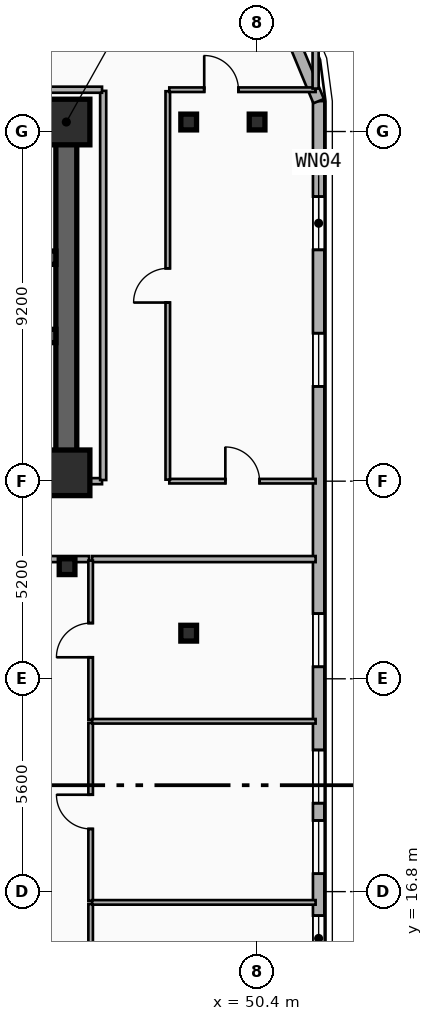
"""IFC4 building model, lengths in metres.
Left out: names, types, materials, properties, quantities, classifications, styles, units other than length and angle.
Written with IfcOpenShell. Run it as: python <this file> out.ifc"""

import sys

from ifc_helpers import new_model, si_unit, direction, frame, frame_2d, origin, origin_2d, place, context, subcontext, project, spatial, rectangle, i_section, extrude, element, fill, save


model = new_model("IFC4")
c1 = context("Model", 3, precision=1e-05, world=origin(), true_north=direction((0.0, 1.0)))
c2 = subcontext(c1, "Body", "Model", "MODEL_VIEW")
j1 = project(units=[si_unit("LENGTHUNIT", "METRE"), si_unit("PLANEANGLEUNIT", "RADIAN")], contexts=[c1])
p1 = place(None, origin())
s1 = spatial("IfcSite", under=j1, at=p1, CompositionType="ELEMENT")
p2 = place(p1, origin())
s2 = spatial("IfcBuilding", under=s1, at=p2, CompositionType="ELEMENT")
p3 = place(p2, frame((0.0, 0.0, 159.0)))
s3 = spatial("IfcBuildingStorey", under=s2, at=p3, CompositionType="ELEMENT", Elevation=159.0)
p4 = place(p3, frame((12.15, 37.05, 0.0), z_axis=(0.0, 0.0, 1.0), x_axis=(1.0, 0.0, 0.0)))
e1 = element("IfcWall", 1, at=p4, inside=s3, PredefinedType="SHEAR", context=c2, shape_type="SweptSolid", body=[
    extrude(rectangle(XDim=33.23, YDim=0.55, at=frame_2d((16.615, 0.0))), origin(), (0.0, 0.0, 1.0), 3.55),
])
p5 = place(p3, frame((45.38, 27.82, 0.0), z_axis=(0.0, 0.0, 1.0), x_axis=(-1.0, 0.0, 0.0)))
e2 = element("IfcWall", 2, at=p5, inside=s3, PredefinedType="SHEAR", context=c2, shape_type="SweptSolid", body=[
    extrude(rectangle(XDim=12.23, YDim=0.55, at=frame_2d((6.115, 0.0))), origin(), (0.0, 0.0, 1.0), 3.55),
])
p6 = place(p5, frame((9.93, 0.0, 0.0)))
e3 = element("IfcOpeningElement", 3, at=p6, cuts=e2, PredefinedType="OPENING", context=c2, shape_type="SweptSolid", body=[
    extrude(rectangle(XDim=1.1, YDim=2.15, at=frame_2d((0.55, 1.075))), frame((0.0, 0.285, 0.0), z_axis=(0.0, -1.0, 0.0), x_axis=(1.0, 0.0, 0.0)), (0.0, 0.0, 1.0), 0.57),
])
p7 = place(p5, frame((6.23, 0.0, 0.0)))
e4 = element("IfcOpeningElement", 4, at=p7, cuts=e2, PredefinedType="OPENING", context=c2, shape_type="SweptSolid", body=[
    extrude(rectangle(XDim=1.1, YDim=2.15, at=frame_2d((0.55, 1.075))), frame((0.0, 0.285, 0.0), z_axis=(0.0, -1.0, 0.0), x_axis=(1.0, 0.0, 0.0)), (0.0, 0.0, 1.0), 0.57),
])
p8 = place(p3, frame((45.38, 28.095, 0.0), z_axis=(0.0, 0.0, 1.0), x_axis=(0.0, 1.0, 0.0)))
e5 = element("IfcWall", 5, at=p8, inside=s3, PredefinedType="SHEAR", context=c2, shape_type="SweptSolid", body=[
    extrude(rectangle(XDim=8.68, YDim=0.55, at=frame_2d((4.34, 0.0))), origin(), (0.0, 0.0, 1.0), 3.55),
])
p9 = place(p3, frame((45.105, 33.48, 0.0), z_axis=(0.0, 0.0, 1.0), x_axis=(-1.0, 0.0, 0.0)))
e6 = element("IfcWall", 6, at=p9, inside=s3, PredefinedType="SHEAR", context=c2, shape_type="SweptSolid", body=[
    extrude(rectangle(XDim=8.55, YDim=0.35, at=frame_2d((4.275, 0.0))), origin(), (0.0, 0.0, 1.0), 3.55),
])
p10 = place(p9, frame((7.205, 0.0, 0.0)))
e7 = element("IfcOpeningElement", 7, at=p10, cuts=e6, PredefinedType="OPENING", context=c2, shape_type="SweptSolid", body=[
    extrude(rectangle(XDim=1.1, YDim=2.15, at=frame_2d((0.55, 1.075))), frame((0.0, 0.185, 0.0), z_axis=(0.0, -1.0, 0.0), x_axis=(1.0, 0.0, 0.0)), (0.0, 0.0, 1.0), 0.37),
])
p11 = place(p3, frame((36.555, 31.42, 0.0), z_axis=(0.0, 0.0, 1.0), x_axis=(1.0, 0.0, 0.0)))
e8 = element("IfcWall", 8, at=p11, inside=s3, PredefinedType="SHEAR", context=c2, shape_type="SweptSolid", body=[
    extrude(rectangle(XDim=8.55, YDim=0.35, at=frame_2d((4.275, 0.0))), origin(), (0.0, 0.0, 1.0), 3.55),
])
for number, where, z_axis, x_axis in (
    (9, (45.4, 27.82, 0.0), (0.0, 0.0, 1.0), (1.0, 0.0, 0.0)),
    (10, (45.4, 37.05, 0.0), (0.0, 0.0, 1.0), (1.0, 0.0, 0.0)),
):
    element("IfcColumn", number, at=place(p3, frame(where, z_axis=z_axis, x_axis=x_axis)), inside=s3, PredefinedType="COLUMN", context=c2, shape_type="SweptSolid", body=[
        extrude(rectangle(XDim=1.2, YDim=1.2, at=origin_2d()), origin(), (0.0, 0.0, 1.0), 3.55),
    ])
for number, where, z_axis, x_axis in (
    (11, (45.4, 25.35, 0.0), (0.0, 0.0, 1.0), (1.0, 0.0, 0.0)),
    (12, (48.6, 23.6, 0.0), (0.0, 0.0, 1.0), (1.0, 0.0, 0.0)),
    (13, (48.6, 37.05, 0.0), (0.0, 0.0, 1.0), (1.0, 0.0, 0.0)),
    (14, (50.4, 37.05, 0.0), (0.0, 0.0, 1.0), (1.0, 0.0, 0.0)),
):
    element("IfcColumn", number, at=place(p3, frame(where, z_axis=z_axis, x_axis=x_axis)), inside=s3, PredefinedType="COLUMN", context=c2, shape_type="SweptSolid", body=[
        extrude(i_section(OverallWidth=0.413, OverallDepth=0.415, WebThickness=0.03, FlangeThickness=0.047, FilletRadius=0.015, at=origin_2d()), origin(), (0.0, 0.0, 1.0), 3.55),
    ])
p12 = place(p3, frame((52.02, 37.6, 0.0), z_axis=(0.0, 0.0, 1.0), x_axis=(0.0, -1.0, 0.0)))
e15 = element("IfcWall", 15, at=p12, inside=s3, PredefinedType="SOLIDWALL", context=c2, shape_type="SweptSolid", body=[
    extrude(rectangle(XDim=23.0, YDim=0.3, at=frame_2d((11.5, 0.0))), origin(), (0.0, 0.0, 1.0), 3.29),
])
p13 = place(p12, frame((2.513, 0.0, 0.34)))
e16 = element("IfcOpeningElement", 16, at=p13, cuts=e15, PredefinedType="OPENING", context=c2, shape_type="SweptSolid", body=[
    extrude(rectangle(XDim=1.4, YDim=2.1, at=frame_2d((0.7, 1.05))), frame((0.0, 0.16, 0.0), z_axis=(0.0, -1.0, 0.0), x_axis=(1.0, 0.0, 0.0)), (0.0, 0.0, 1.0), 0.32),
])
p14 = place(p12, frame((6.107, 0.0, 0.34)))
e17 = element("IfcOpeningElement", 17, at=p14, cuts=e15, PredefinedType="OPENING", context=c2, shape_type="SweptSolid", body=[
    extrude(rectangle(XDim=1.4, YDim=2.1, at=frame_2d((0.7, 1.05))), frame((0.0, 0.16, 0.0), z_axis=(0.0, -1.0, 0.0), x_axis=(1.0, 0.0, 0.0)), (0.0, 0.0, 1.0), 0.32),
])
p15 = place(p12, frame((21.431, 0.0, 0.68)))
e18 = element("IfcOpeningElement", 18, at=p15, cuts=e15, PredefinedType="OPENING", context=c2, shape_type="SweptSolid", body=[
    extrude(rectangle(XDim=1.2, YDim=1.5, at=frame_2d((0.6, 0.75))), frame((0.0, 0.16, 0.0), z_axis=(0.0, -1.0, 0.0), x_axis=(1.0, 0.0, 0.0)), (0.0, 0.0, 1.0), 0.32),
])
p16 = place(p12, frame((17.073, 0.0, 0.34)))
e19 = element("IfcOpeningElement", 19, at=p16, cuts=e15, PredefinedType="OPENING", context=c2, shape_type="SweptSolid", body=[
    extrude(rectangle(XDim=1.4, YDim=2.1, at=frame_2d((0.7, 1.05))), frame((0.0, 0.16, 0.0), z_axis=(0.0, -1.0, 0.0), x_axis=(1.0, 0.0, 0.0)), (0.0, 0.0, 1.0), 0.32),
])
p17 = place(p12, frame((18.928, 0.0, 0.34)))
e20 = element("IfcOpeningElement", 20, at=p17, cuts=e15, PredefinedType="OPENING", context=c2, shape_type="SweptSolid", body=[
    extrude(rectangle(XDim=1.4, YDim=2.1, at=frame_2d((0.7, 1.05))), frame((0.0, 0.16, 0.0), z_axis=(0.0, -1.0, 0.0), x_axis=(1.0, 0.0, 0.0)), (0.0, 0.0, 1.0), 0.32),
])
p18 = place(p12, frame((13.484, 0.0, 0.34)))
e21 = element("IfcOpeningElement", 21, at=p18, cuts=e15, PredefinedType="OPENING", context=c2, shape_type="SweptSolid", body=[
    extrude(rectangle(XDim=1.4, YDim=2.1, at=frame_2d((0.7, 1.05))), frame((0.0, 0.16, 0.0), z_axis=(0.0, -1.0, 0.0), x_axis=(1.0, 0.0, 0.0)), (0.0, 0.0, 1.0), 0.32),
])
p19 = place(p3, frame((50.843, 40.443, 0.0), z_axis=(0.0, 0.0, 1.0), x_axis=(0.382704529509, -0.923870793506, 0.0)))
e22 = element("IfcWall", 22, at=p19, inside=s3, PredefinedType="SOLIDWALL", context=c2, shape_type="SweptSolid", body=[
    extrude(rectangle(XDim=3.077, YDim=0.3, at=frame_2d((1.538, 0.0))), origin(), (0.0, 0.0, 1.0), 3.29),
])
p20 = place(p3, frame((48.09, 27.6, 0.0), z_axis=(0.0, 0.0, 1.0), x_axis=(1.0, 0.0, 0.0)))
e23 = element("IfcWall", 23, at=p20, inside=s3, PredefinedType="PARTITIONING", context=c2, shape_type="SweptSolid", body=[
    extrude(rectangle(XDim=3.85, YDim=0.12, at=frame_2d((1.925, 0.0))), origin(), (0.0, 0.0, 1.0), 2.62),
])
p21 = place(p20, frame((1.475, 0.0, 0.0)))
e24 = element("IfcOpeningElement", 24, at=p21, cuts=e23, PredefinedType="OPENING", context=c2, shape_type="SweptSolid", body=[
    extrude(rectangle(XDim=0.9, YDim=2.1, at=frame_2d((0.45, 1.05))), frame((0.0, 0.07, 0.0), z_axis=(0.0, -1.0, 0.0), x_axis=(1.0, 0.0, 0.0)), (0.0, 0.0, 1.0), 0.14),
])
p22 = place(p3, frame((41.09, 25.55, 0.0), z_axis=(0.0, 0.0, 1.0), x_axis=(1.0, 0.0, 0.0)))
e25 = element("IfcWall", 25, at=p22, inside=s3, PredefinedType="PARTITIONING", context=c2, shape_type="SweptSolid", body=[
    extrude(rectangle(XDim=4.89, YDim=0.16, at=frame_2d((2.445, 0.0))), origin(), (0.0, 0.0, 1.0), 2.36),
])
p23 = place(p22, frame((1.945, 0.0, 0.0)))
e26 = element("IfcOpeningElement", 26, at=p23, cuts=e25, PredefinedType="OPENING", context=c2, shape_type="SweptSolid", body=[
    extrude(rectangle(XDim=1.0, YDim=2.15, at=frame_2d((0.5, 1.075))), frame((0.0, 0.09, 0.0), z_axis=(0.0, -1.0, 0.0), x_axis=(1.0, 0.0, 0.0)), (0.0, 0.0, 1.0), 0.18),
])
p24 = place(p3, frame((46.06, 25.55, 0.0), z_axis=(0.0, 0.0, 1.0), x_axis=(1.0, 0.0, 0.0)))
e27 = element("IfcWall", 27, at=p24, inside=s3, PredefinedType="PARTITIONING", context=c2, shape_type="SweptSolid", body=[
    extrude(rectangle(XDim=5.88, YDim=0.16, at=frame_2d((2.94, 0.0))), origin(), (0.0, 0.0, 1.0), 2.62),
])
p25 = place(p3, frame((48.05, 27.64, 0.0), z_axis=(0.0, 0.0, 1.0), x_axis=(0.0, 1.0, 0.0)))
e28 = element("IfcWall", 28, at=p25, inside=s3, PredefinedType="PARTITIONING", context=c2, shape_type="SweptSolid", body=[
    extrude(rectangle(XDim=10.22, YDim=0.12, at=frame_2d((5.11, 0.0))), origin(), (0.0, 0.0, 1.0), 2.77),
])
p26 = place(p25, frame((4.66, 0.0, 0.0)))
e29 = element("IfcOpeningElement", 29, at=p26, cuts=e28, PredefinedType="OPENING", context=c2, shape_type="SweptSolid", body=[
    extrude(rectangle(XDim=0.9, YDim=2.1, at=frame_2d((0.45, 1.05))), frame((0.0, 0.07, 0.0), z_axis=(0.0, -1.0, 0.0), x_axis=(1.0, 0.0, 0.0)), (0.0, 0.0, 1.0), 0.14),
])
p27 = place(p3, frame((48.09, 37.9, 0.0), z_axis=(0.0, 0.0, 1.0), x_axis=(1.0, 0.0, 0.0)))
e30 = element("IfcWall", 30, at=p27, inside=s3, PredefinedType="PARTITIONING", context=c2, shape_type="SweptSolid", body=[
    extrude(rectangle(XDim=3.85, YDim=0.12, at=frame_2d((1.925, 0.0))), origin(), (0.0, 0.0, 1.0), 3.29),
])
p28 = place(p27, frame((0.919, 0.0, 0.0)))
e31 = element("IfcOpeningElement", 31, at=p28, cuts=e30, PredefinedType="OPENING", context=c2, shape_type="SweptSolid", body=[
    extrude(rectangle(XDim=0.9, YDim=2.1, at=frame_2d((0.45, 1.05))), frame((0.0, 0.07, 0.0), z_axis=(0.0, -1.0, 0.0), x_axis=(1.0, 0.0, 0.0)), (0.0, 0.0, 1.0), 0.14),
])
p29 = place(p3, frame((46.02, 10.66, 0.0), z_axis=(0.0, 0.0, 1.0), x_axis=(0.0, 1.0, 0.0)))
e32 = element("IfcWall", 32, at=p29, inside=s3, PredefinedType="PARTITIONING", context=c2, shape_type="SweptSolid", body=[
    extrude(rectangle(XDim=5.817, YDim=0.12, at=frame_2d((2.909, 0.0))), origin(), (0.0, 0.0, 1.0), 2.97),
])
p30 = place(p29, frame((2.458, 0.0, 0.0)))
e33 = element("IfcOpeningElement", 33, at=p30, cuts=e32, PredefinedType="OPENING", context=c2, shape_type="SweptSolid", body=[
    extrude(rectangle(XDim=0.9, YDim=2.1, at=frame_2d((0.45, 1.05))), frame((0.0, 0.07, 0.0), z_axis=(0.0, -1.0, 0.0), x_axis=(1.0, 0.0, 0.0)), (0.0, 0.0, 1.0), 0.14),
])
p31 = place(p3, frame((46.02, 16.557, 0.0), z_axis=(0.0, 0.0, 1.0), x_axis=(0.0, 1.0, 0.0)))
e34 = element("IfcWall", 34, at=p31, inside=s3, PredefinedType="PARTITIONING", context=c2, shape_type="SweptSolid", body=[
    extrude(rectangle(XDim=4.685, YDim=0.12, at=frame_2d((2.343, 0.0))), origin(), (0.0, 0.0, 1.0), 2.97),
])
p32 = place(p31, frame((1.893, 0.0, 0.0)))
e35 = element("IfcOpeningElement", 35, at=p32, cuts=e34, PredefinedType="OPENING", context=c2, shape_type="SweptSolid", body=[
    extrude(rectangle(XDim=0.9, YDim=2.1, at=frame_2d((0.45, 1.05))), frame((0.0, 0.07, 0.0), z_axis=(0.0, -1.0, 0.0), x_axis=(1.0, 0.0, 0.0)), (0.0, 0.0, 1.0), 0.14),
])
p33 = place(p3, frame((46.02, 21.322, 0.0), z_axis=(0.0, 0.0, 1.0), x_axis=(0.0, 1.0, 0.0)))
e36 = element("IfcWall", 36, at=p33, inside=s3, PredefinedType="PARTITIONING", context=c2, shape_type="SweptSolid", body=[
    extrude(rectangle(XDim=4.188, YDim=0.12, at=frame_2d((2.094, 0.0))), origin(), (0.0, 0.0, 1.0), 2.77),
])
p34 = place(p33, frame((1.644, 0.0, 0.0)))
e37 = element("IfcOpeningElement", 37, at=p34, cuts=e36, PredefinedType="OPENING", context=c2, shape_type="SweptSolid", body=[
    extrude(rectangle(XDim=0.9, YDim=2.1, at=frame_2d((0.45, 1.05))), frame((0.0, 0.07, 0.0), z_axis=(0.0, -1.0, 0.0), x_axis=(1.0, 0.0, 0.0)), (0.0, 0.0, 1.0), 0.14),
])
for number, where, z_axis, x_axis in (
    (38, (46.06, 16.517, 0.0), (0.0, 0.0, 1.0), (1.0, 0.0, 0.0)),
    (39, (46.06, 21.282, 0.0), (0.0, 0.0, 1.0), (1.0, 0.0, 0.0)),
):
    element("IfcWall", number, at=place(p3, frame(where, z_axis=z_axis, x_axis=x_axis)), inside=s3, PredefinedType="PARTITIONING", context=c2, shape_type="SweptSolid", body=[
        extrude(rectangle(XDim=5.88, YDim=0.12, at=frame_2d((2.94, 0.0))), origin(), (0.0, 0.0, 1.0), 2.62),
    ])
p35 = place(p3, frame((45.41, 27.6, 0.0), z_axis=(0.0, 0.0, 1.0), x_axis=(1.0, 0.0, 0.0)))
e40 = element("IfcWall", 40, at=p35, inside=s3, PredefinedType="PARTITIONING", context=c2, shape_type="SweptSolid", body=[
    extrude(rectangle(XDim=0.91, YDim=0.16, at=frame_2d((0.455, 0.0))), origin(), (0.0, 0.0, 1.0), 2.36),
])
p36 = place(p3, frame((46.35, 27.63, 0.0), z_axis=(0.0, 0.0, 1.0), x_axis=(0.0, 1.0, 0.0)))
e41 = element("IfcWall", 41, at=p36, inside=s3, PredefinedType="PARTITIONING", context=c2, shape_type="SweptSolid", body=[
    extrude(rectangle(XDim=10.24, YDim=0.16, at=frame_2d((5.12, 0.0))), origin(), (0.0, 0.0, 1.0), 2.77),
])
p37 = place(p3, frame((11.28, 37.9, 0.0), z_axis=(0.0, 0.0, 1.0), x_axis=(1.0, 0.0, 0.0)))
e42 = element("IfcWall", 42, at=p37, inside=s3, PredefinedType="PARTITIONING", context=c2, shape_type="SweptSolid", body=[
    extrude(rectangle(XDim=35.04, YDim=0.16, at=frame_2d((17.52, 0.0))), origin(), (0.0, 0.0, 1.0), 3.29),
])
p38 = place(p3, frame((51.94, 37.93, 0.0), z_axis=(0.0, 0.0, 1.0), x_axis=(0.0, 1.0, 0.0)))
e43 = element("IfcWall", 43, at=p38, inside=s3, PredefinedType="PARTITIONING", context=c2, shape_type="SweptSolid", body=[
    extrude(rectangle(XDim=1.44, YDim=0.16, at=frame_2d((0.72, 0.0))), origin(), (0.0, 0.0, 1.0), 3.29),
])
p39 = place(p13, origin())
e44 = element("IfcWindow", 44, at=p39, inside=s3, PartitioningType="SINGLE_PANEL", PredefinedType="WINDOW", context=c2, shape_type="SweptSolid", body=[
    extrude(rectangle(XDim=1.4, YDim=2.1, at=frame_2d((0.7, 1.05))), frame((0.0, 0.03, 0.0), z_axis=(0.0, -1.0, 0.0), x_axis=(1.0, 0.0, 0.0)), (0.0, 0.0, 1.0), 0.06),
])
fill(e16, e44)
p40 = place(p14, origin())
e45 = element("IfcWindow", 45, at=p40, inside=s3, PartitioningType="SINGLE_PANEL", PredefinedType="WINDOW", context=c2, shape_type="SweptSolid", body=[
    extrude(rectangle(XDim=1.4, YDim=2.1, at=frame_2d((0.7, 1.05))), frame((0.0, 0.03, 0.0), z_axis=(0.0, -1.0, 0.0), x_axis=(1.0, 0.0, 0.0)), (0.0, 0.0, 1.0), 0.06),
])
fill(e17, e45)
p41 = place(p15, origin())
e46 = element("IfcWindow", 46, at=p41, inside=s3, PartitioningType="SINGLE_PANEL", PredefinedType="WINDOW", context=c2, shape_type="SweptSolid", body=[
    extrude(rectangle(XDim=1.2, YDim=1.5, at=frame_2d((0.6, 0.75))), frame((0.0, 0.03, 0.0), z_axis=(0.0, -1.0, 0.0), x_axis=(1.0, 0.0, 0.0)), (0.0, 0.0, 1.0), 0.06),
])
fill(e18, e46)
p42 = place(p16, origin())
e47 = element("IfcWindow", 47, at=p42, inside=s3, PartitioningType="SINGLE_PANEL", PredefinedType="WINDOW", context=c2, shape_type="SweptSolid", body=[
    extrude(rectangle(XDim=1.4, YDim=2.1, at=frame_2d((0.7, 1.05))), frame((0.0, 0.03, 0.0), z_axis=(0.0, -1.0, 0.0), x_axis=(1.0, 0.0, 0.0)), (0.0, 0.0, 1.0), 0.06),
])
fill(e19, e47)
p43 = place(p17, origin())
e48 = element("IfcWindow", 48, at=p43, inside=s3, PartitioningType="SINGLE_PANEL", PredefinedType="WINDOW", context=c2, shape_type="SweptSolid", body=[
    extrude(rectangle(XDim=1.4, YDim=2.1, at=frame_2d((0.7, 1.05))), frame((0.0, 0.03, 0.0), z_axis=(0.0, -1.0, 0.0), x_axis=(1.0, 0.0, 0.0)), (0.0, 0.0, 1.0), 0.06),
])
fill(e20, e48)
p44 = place(p18, origin())
e49 = element("IfcWindow", 49, at=p44, inside=s3, PartitioningType="SINGLE_PANEL", PredefinedType="WINDOW", context=c2, shape_type="SweptSolid", body=[
    extrude(rectangle(XDim=1.4, YDim=2.1, at=frame_2d((0.7, 1.05))), frame((0.0, 0.03, 0.0), z_axis=(0.0, -1.0, 0.0), x_axis=(1.0, 0.0, 0.0)), (0.0, 0.0, 1.0), 0.06),
])
fill(e21, e49)
p45 = place(p21, origin())
e50 = element("IfcDoor", 50, at=p45, inside=s3, OperationType="SINGLE_SWING_LEFT", PredefinedType="DOOR", context=c2, shape_type="SweptSolid", body=[
    extrude(rectangle(XDim=0.9, YDim=2.1, at=frame_2d((0.45, 1.05))), frame((0.0, 0.025, 0.0), z_axis=(0.0, -1.0, 0.0), x_axis=(1.0, 0.0, 0.0)), (0.0, 0.0, 1.0), 0.05),
])
fill(e24, e50)
p46 = place(p26, origin())
e51 = element("IfcDoor", 51, at=p46, inside=s3, OperationType="SINGLE_SWING_LEFT", PredefinedType="DOOR", context=c2, shape_type="SweptSolid", body=[
    extrude(rectangle(XDim=0.9, YDim=2.1, at=frame_2d((0.45, 1.05))), frame((0.0, 0.025, 0.0), z_axis=(0.0, -1.0, 0.0), x_axis=(1.0, 0.0, 0.0)), (0.0, 0.0, 1.0), 0.05),
])
fill(e29, e51)
p47 = place(p28, origin())
e52 = element("IfcDoor", 52, at=p47, inside=s3, OperationType="SINGLE_SWING_LEFT", PredefinedType="DOOR", context=c2, shape_type="SweptSolid", body=[
    extrude(rectangle(XDim=0.9, YDim=2.1, at=frame_2d((0.45, 1.05))), frame((0.0, 0.025, 0.0), z_axis=(0.0, -1.0, 0.0), x_axis=(1.0, 0.0, 0.0)), (0.0, 0.0, 1.0), 0.05),
])
fill(e31, e52)
p48 = place(p32, origin())
e53 = element("IfcDoor", 53, at=p48, inside=s3, OperationType="SINGLE_SWING_RIGHT", PredefinedType="DOOR", context=c2, shape_type="SweptSolid", body=[
    extrude(rectangle(XDim=0.9, YDim=2.1, at=frame_2d((0.45, 1.05))), frame((0.0, 0.025, 0.0), z_axis=(0.0, -1.0, 0.0), x_axis=(1.0, 0.0, 0.0)), (0.0, 0.0, 1.0), 0.05),
])
fill(e35, e53)
p49 = place(p34, origin())
e54 = element("IfcDoor", 54, at=p49, inside=s3, OperationType="SINGLE_SWING_LEFT", PredefinedType="DOOR", context=c2, shape_type="SweptSolid", body=[
    extrude(rectangle(XDim=0.9, YDim=2.1, at=frame_2d((0.45, 1.05))), frame((0.0, 0.025, 0.0), z_axis=(0.0, -1.0, 0.0), x_axis=(1.0, 0.0, 0.0)), (0.0, 0.0, 1.0), 0.05),
])
fill(e37, e54)
save(model, sys.argv[1])
